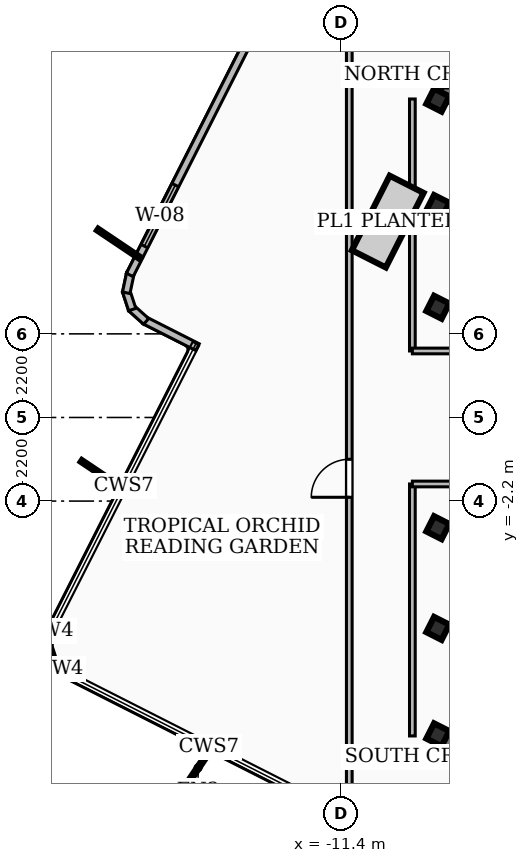
"""IFC4 building model, lengths in metres.
Left out: names, types, materials, properties, quantities, classifications, styles, units other than length and angle.
Written with IfcOpenShell. Run it as: python <this file> out.ifc"""

import sys

from ifc_helpers import new_model, si_unit, direction, frame, frame_2d, origin, origin_2d, place, context, subcontext, project, spatial, rectangle, hollow_rectangle, extrude, element, fill, save


model = new_model("IFC4")
c1 = context("Model", 3, precision=1e-05, world=origin(), true_north=direction((0.0, 1.0)))
c2 = subcontext(c1, "Body", "Model", "MODEL_VIEW")
j1 = project(units=[si_unit("LENGTHUNIT", "METRE"), si_unit("PLANEANGLEUNIT", "RADIAN")], contexts=[c1])
p1 = place(None, origin())
s1 = spatial("IfcSite", under=j1, at=p1, CompositionType="ELEMENT")
p2 = place(p1, origin())
s2 = spatial("IfcBuilding", under=s1, at=p2, CompositionType="ELEMENT")
p3 = place(p2, frame((0.0, 0.0, 289.26)))
s3 = spatial("IfcBuildingStorey", under=s2, at=p3, CompositionType="ELEMENT", Elevation=289.26)
for number, where, z_axis, x_axis in (
    (1, (-8.78, 8.51, 0.0), (0.0, 0.0, 1.0), (1.0, 0.0, 0.0)),
    (2, (8.78, -8.51, 0.0), (0.0, 0.0, 1.0), (-1.0, 0.0, 0.0)),
):
    element("IfcWall", number, at=place(p3, frame(where, z_axis=z_axis, x_axis=x_axis)), inside=s3, PredefinedType="SHEAR", context=c2, shape_type="SweptSolid", body=[
        extrude(rectangle(XDim=17.56, YDim=0.4, at=frame_2d((8.78, 0.0))), origin(), (0.0, 0.0, 1.0), 3.84),
    ])
for number, where, z_axis, x_axis in (
    (3, (-8.85, -5.55, 0.0), (0.0, 0.0, 1.0), (0.452, 0.892, 0.0)),
    (4, (-8.85, -2.9, 0.0), (0.0, 0.0, 1.0), (0.452, 0.892, 0.0)),
    (5, (-8.85, 2.9, 0.0), (0.0, 0.0, 1.0), (0.452, 0.892, 0.0)),
    (6, (-8.85, 5.55, 0.0), (0.0, 0.0, 1.0), (0.452, 0.892, 0.0)),
    (7, (-8.85, 8.35, 0.0), (0.0, 0.0, 1.0), (0.452, 0.892, 0.0)),
    (8, (-8.85, -8.35, 0.0), (0.0, 0.0, 1.0), (0.452, 0.892, 0.0)),
):
    element("IfcColumn", number, at=place(p3, frame(where, z_axis=z_axis, x_axis=x_axis)), inside=s3, PredefinedType="COLUMN", context=c2, shape_type="SweptSolid", body=[
        extrude(hollow_rectangle(XDim=0.45, YDim=0.45, WallThickness=0.022, at=origin_2d()), origin(), (0.0, 0.0, 1.0), 4.14),
    ])
p4 = place(p3, frame((-18.588, -6.785, 0.0), z_axis=(0.0, 0.0, 1.0), x_axis=(-0.745954062295, 0.665997400104, 0.0)))
e9 = element("IfcWall", 9, at=p4, inside=s3, PredefinedType="SOLIDWALL", context=c2, shape_type="SweptSolid", body=[
    extrude(rectangle(XDim=0.528, YDim=0.2, at=frame_2d((0.264, 0.0))), origin(), (0.0, 0.0, 1.0), 3.84),
])
p5 = place(p3, frame((-18.955, -6.474, 0.0), z_axis=(0.0, 0.0, 1.0), x_axis=(-0.310813054196, 0.950471064968, 0.0)))
e10 = element("IfcWall", 10, at=p5, inside=s3, PredefinedType="SOLIDWALL", context=c2, shape_type="SweptSolid", body=[
    extrude(rectangle(XDim=0.514, YDim=0.2, at=frame_2d((0.257, 0.0))), origin(), (0.0, 0.0, 1.0), 3.84),
])
p6 = place(p3, frame((-19.112, -6.033, 0.0), z_axis=(0.0, 0.0, 1.0), x_axis=(0.205193375664, 0.978721450967, 0.0)))
e11 = element("IfcWall", 11, at=p6, inside=s3, PredefinedType="SOLIDWALL", context=c2, shape_type="SweptSolid", body=[
    extrude(rectangle(XDim=0.527, YDim=0.2, at=frame_2d((0.264, 0.0))), origin(), (0.0, 0.0, 1.0), 3.84),
])
p7 = place(p3, frame((-15.173, 1.85, 0.0), z_axis=(0.0, 0.0, 1.0), x_axis=(-0.892006356627, 0.452022853113, 0.0)))
e12 = element("IfcWall", 12, at=p7, inside=s3, PredefinedType="SOLIDWALL", context=c2, shape_type="SweptSolid", body=[
    extrude(rectangle(XDim=1.562, YDim=0.2, at=frame_2d((0.781, 0.0))), origin(), (0.0, 0.0, 1.0), 3.84),
])
p8 = place(p3, frame((-16.525, 2.528, 0.0), z_axis=(0.0, 0.0, 1.0), x_axis=(-0.743983074, 0.668198462735, 0.0)))
e13 = element("IfcWall", 13, at=p8, inside=s3, PredefinedType="SOLIDWALL", context=c2, shape_type="SweptSolid", body=[
    extrude(rectangle(XDim=0.528, YDim=0.2, at=frame_2d((0.264, 0.0))), origin(), (0.0, 0.0, 1.0), 3.84),
])
p9 = place(p3, frame((-16.891, 2.84, 0.0), z_axis=(0.0, 0.0, 1.0), x_axis=(-0.312526265177, 0.949909118587, 0.0)))
e14 = element("IfcWall", 14, at=p9, inside=s3, PredefinedType="SOLIDWALL", context=c2, shape_type="SweptSolid", body=[
    extrude(rectangle(XDim=0.515, YDim=0.2, at=frame_2d((0.257, 0.0))), origin(), (0.0, 0.0, 1.0), 3.84),
])
p10 = place(p3, frame((-17.049, 3.281, 0.0), z_axis=(0.0, 0.0, 1.0), x_axis=(0.207342794077, 0.978268350579, 0.0)))
e15 = element("IfcWall", 15, at=p10, inside=s3, PredefinedType="SOLIDWALL", context=c2, shape_type="SweptSolid", body=[
    extrude(rectangle(XDim=0.526, YDim=0.2, at=frame_2d((0.263, 0.0))), origin(), (0.0, 0.0, 1.0), 3.84),
])
p11 = place(p3, frame((-16.956, 3.75, 0.0), z_axis=(0.0, 0.0, 1.0), x_axis=(0.452065793094, 0.891984595559, 0.0)))
e16 = element("IfcWall", 16, at=p11, inside=s3, PredefinedType="SOLIDWALL", context=c2, shape_type="SweptSolid", body=[
    extrude(rectangle(XDim=8.643, YDim=0.2, at=frame_2d((4.321, 0.0))), origin(), (0.0, 0.0, 1.0), 3.84),
])
p12 = place(p11, frame((0.85, 0.0, 0.85)))
e17 = element("IfcOpeningElement", 17, at=p12, cuts=e16, PredefinedType="OPENING", context=c2, shape_type="SweptSolid", body=[
    extrude(rectangle(XDim=1.8, YDim=1.8, at=frame_2d((0.9, 0.9))), frame((0.0, 0.11, 0.0), z_axis=(0.0, -1.0, 0.0), x_axis=(1.0, 0.0, 0.0)), (0.0, 0.0, 1.0), 0.22),
])
p13 = place(p3, frame((-9.52, 1.75, 0.0), z_axis=(0.0, 0.0, 1.0), x_axis=(0.0, 1.0, 0.0)))
e18 = element("IfcWall", 18, at=p13, inside=s3, PredefinedType="PARTITIONING", context=c2, shape_type="SweptSolid", body=[
    extrude(rectangle(XDim=6.63, YDim=0.15, at=frame_2d((3.315, 0.0))), origin(), (0.0, 0.0, 1.0), 3.21),
])
p14 = place(p3, frame((-7.85, 1.75, 0.0), z_axis=(0.0, 0.0, 1.0), x_axis=(-1.0, 0.0, 0.0)))
e19 = element("IfcWall", 19, at=p14, inside=s3, PredefinedType="PARTITIONING", context=c2, shape_type="SweptSolid", body=[
    extrude(rectangle(XDim=1.67, YDim=0.15, at=frame_2d((0.835, 0.0))), origin(), (0.0, 0.0, 1.0), 3.07),
])
p15 = place(p3, frame((-9.52, -8.38, 0.0), z_axis=(0.0, 0.0, 1.0), x_axis=(0.0, 1.0, 0.0)))
e20 = element("IfcWall", 20, at=p15, inside=s3, PredefinedType="PARTITIONING", context=c2, shape_type="SweptSolid", body=[
    extrude(rectangle(XDim=6.63, YDim=0.15, at=frame_2d((3.315, 0.0))), origin(), (0.0, 0.0, 1.0), 3.84),
])
p16 = place(p3, frame((-7.85, -1.75, 0.0), z_axis=(0.0, 0.0, 1.0), x_axis=(-1.0, 0.0, 0.0)))
e21 = element("IfcWall", 21, at=p16, inside=s3, PredefinedType="PARTITIONING", context=c2, shape_type="SweptSolid", body=[
    extrude(rectangle(XDim=1.67, YDim=0.15, at=frame_2d((0.835, 0.0))), origin(), (0.0, 0.0, 1.0), 3.07),
])
p17 = place(p3, frame((-11.18, -10.568, 0.0), z_axis=(0.0, 0.0, 1.0), x_axis=(0.0, 1.0, 0.0)))
e22 = element("IfcWall", 22, at=p17, inside=s3, PredefinedType="PARTITIONING", context=c2, shape_type="SweptSolid", body=[
    extrude(rectangle(XDim=22.003, YDim=0.15, at=frame_2d((11.001, 0.0))), origin(), (0.0, 0.0, 1.0), 3.84),
])
p18 = place(p17, frame((8.468, 0.0, 0.0)))
e23 = element("IfcOpeningElement", 23, at=p18, cuts=e22, PredefinedType="OPENING", context=c2, shape_type="SweptSolid", body=[
    extrude(rectangle(XDim=1.0, YDim=2.1, at=frame_2d((0.5, 1.05))), frame((0.0, 0.085, 0.0), z_axis=(0.0, -1.0, 0.0), x_axis=(1.0, 0.0, 0.0)), (0.0, 0.0, 1.0), 0.17),
])
p19 = place(p12, origin())
e24 = element("IfcWindow", 24, at=p19, inside=s3, PartitioningType="SINGLE_PANEL", PredefinedType="WINDOW", context=c2, shape_type="SweptSolid", body=[
    extrude(rectangle(XDim=1.8, YDim=1.8, at=frame_2d((0.9, 0.9))), frame((0.0, 0.03, 0.0), z_axis=(0.0, -1.0, 0.0), x_axis=(1.0, 0.0, 0.0)), (0.0, 0.0, 1.0), 0.06),
])
fill(e17, e24)
p20 = place(p18, origin())
e25 = element("IfcDoor", 25, at=p20, inside=s3, OperationType="SINGLE_SWING_LEFT", PredefinedType="DOOR", context=c2, shape_type="SweptSolid", body=[
    extrude(rectangle(XDim=1.0, YDim=2.1, at=frame_2d((0.5, 1.05))), frame((0.0, 0.025, 0.0), z_axis=(0.0, -1.0, 0.0), x_axis=(1.0, 0.0, 0.0)), (0.0, 0.0, 1.0), 0.05),
])
fill(e23, e25)
save(model, sys.argv[1])
